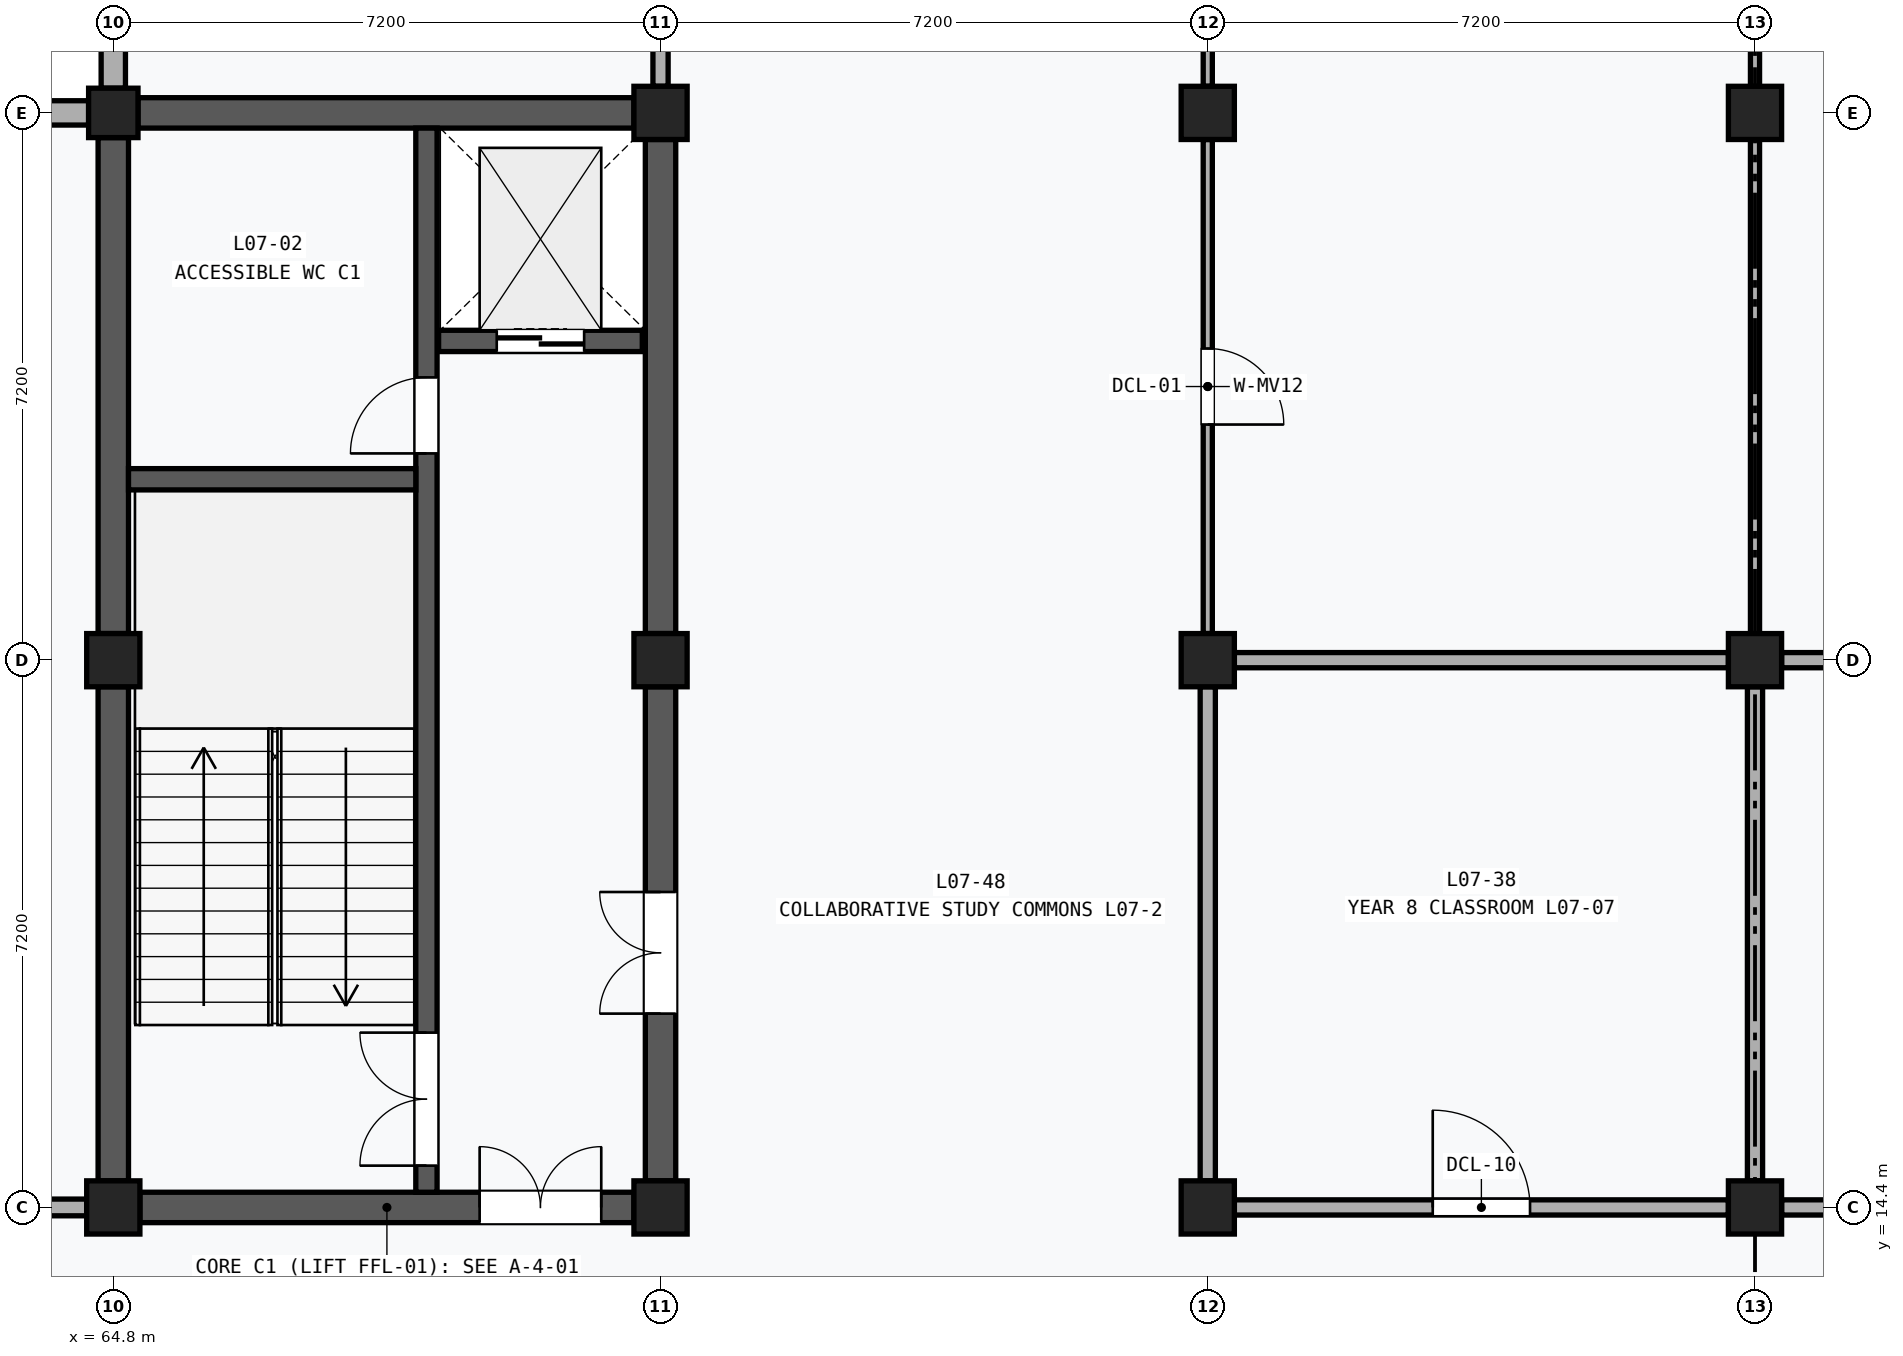
"""IFC4 building model, lengths in metres.
Left out: names, types, materials, properties, quantities, classifications, styles, units other than length and angle.
Written with IfcOpenShell. Run it as: python <this file> out.ifc"""

import sys

from ifc_helpers import new_model, si_unit, direction, frame, frame_2d, origin, origin_2d, place, context, subcontext, project, spatial, rectangle, extrude, element, fill, save


model = new_model("IFC4")
c1 = context("Model", 3, precision=1e-05, world=origin(), true_north=direction((0.0, 1.0)))
c2 = subcontext(c1, "Body", "Model", "MODEL_VIEW")
j1 = project(units=[si_unit("LENGTHUNIT", "METRE"), si_unit("PLANEANGLEUNIT", "RADIAN")], contexts=[c1])
p1 = place(None, origin())
s1 = spatial("IfcSite", under=j1, at=p1, CompositionType="ELEMENT")
p2 = place(p1, origin())
s2 = spatial("IfcBuilding", under=s1, at=p2, CompositionType="ELEMENT")
p3 = place(p2, frame((0.0, 0.0, 30.6)))
s3 = spatial("IfcBuildingStorey", under=s2, at=p3, CompositionType="ELEMENT", Elevation=30.6)
for number, where, z_axis, x_axis in (
    (1, (64.8, 14.4, 0.0), (0.0, 0.0, 1.0), (1.0, 0.0, 0.0)),
    (2, (64.8, 21.6, 0.0), (0.0, 0.0, 1.0), (1.0, 0.0, 0.0)),
):
    element("IfcColumn", number, at=place(p3, frame(where, z_axis=z_axis, x_axis=x_axis)), inside=s3, PredefinedType="COLUMN", context=c2, shape_type="SweptSolid", body=[
        extrude(rectangle(XDim=0.7, YDim=0.7, at=origin_2d()), origin(), (0.0, 0.0, 1.0), 4.2),
    ])
p4 = place(p3, frame((64.8, 28.8, 0.0), z_axis=(0.0, 0.0, 1.0), x_axis=(1.0, 0.0, 0.0)))
e3 = element("IfcColumn", 3, at=p4, inside=s3, PredefinedType="COLUMN", context=c2, shape_type="SweptSolid", body=[
    extrude(rectangle(XDim=0.65, YDim=0.65, at=origin_2d()), origin(), (0.0, 0.0, 1.0), 4.2),
])
for number, where, z_axis, x_axis in (
    (4, (72.0, 14.4, 0.0), (0.0, 0.0, 1.0), (1.0, 0.0, 0.0)),
    (5, (72.0, 21.6, 0.0), (0.0, 0.0, 1.0), (1.0, 0.0, 0.0)),
    (6, (72.0, 28.8, 0.0), (0.0, 0.0, 1.0), (1.0, 0.0, 0.0)),
    (7, (79.2, 14.4, 0.0), (0.0, 0.0, 1.0), (1.0, 0.0, 0.0)),
    (8, (79.2, 21.6, 0.0), (0.0, 0.0, 1.0), (1.0, 0.0, 0.0)),
    (9, (79.2, 28.8, 0.0), (0.0, 0.0, 1.0), (1.0, 0.0, 0.0)),
    (10, (86.4, 14.4, 0.0), (0.0, 0.0, 1.0), (1.0, 0.0, 0.0)),
    (11, (86.4, 21.6, 0.0), (0.0, 0.0, 1.0), (1.0, 0.0, 0.0)),
    (12, (86.4, 28.8, 0.0), (0.0, 0.0, 1.0), (1.0, 0.0, 0.0)),
):
    element("IfcColumn", number, at=place(p3, frame(where, z_axis=z_axis, x_axis=x_axis)), inside=s3, PredefinedType="COLUMN", context=c2, shape_type="SweptSolid", body=[
        extrude(rectangle(XDim=0.7, YDim=0.7, at=origin_2d()), origin(), (0.0, 0.0, 1.0), 4.2),
    ])
p5 = place(p3, frame((57.925, 28.8, 0.0), z_axis=(0.0, 0.0, 1.0), x_axis=(1.0, 0.0, 0.0)))
e13 = element("IfcWall", 13, at=p5, inside=s3, PredefinedType="SOLIDWALL", context=c2, shape_type="SweptSolid", body=[
    extrude(rectangle(XDim=6.55, YDim=0.32, at=frame_2d((3.275, 0.0))), origin(), (0.0, 0.0, 1.0), 3.25),
])
p6 = place(p5, frame((2.225, 0.0, 0.85)))
e14 = element("IfcOpeningElement", 14, at=p6, cuts=e13, PredefinedType="OPENING", context=c2, shape_type="SweptSolid", body=[
    extrude(rectangle(XDim=2.1, YDim=2.0, at=frame_2d((1.05, 1.0))), frame((0.0, 0.172, 0.0), z_axis=(0.0, -1.0, 0.0), x_axis=(1.0, 0.0, 0.0)), (0.0, 0.0, 1.0), 0.344),
])
p7 = place(p3, frame((64.8, 29.125, 0.0), z_axis=(0.0, 0.0, 1.0), x_axis=(0.0, 1.0, 0.0)))
e15 = element("IfcWall", 15, at=p7, inside=s3, PredefinedType="SOLIDWALL", context=c2, shape_type="SweptSolid", body=[
    extrude(rectangle(XDim=6.55, YDim=0.32, at=frame_2d((3.275, 0.0))), origin(), (0.0, 0.0, 1.0), 3.25),
])
p8 = place(p7, frame((2.075, 0.0, 0.85)))
e16 = element("IfcOpeningElement", 16, at=p8, cuts=e15, PredefinedType="OPENING", context=c2, shape_type="SweptSolid", body=[
    extrude(rectangle(XDim=2.4, YDim=2.0, at=frame_2d((1.2, 1.0))), frame((0.0, 0.172, 0.0), z_axis=(0.0, -1.0, 0.0), x_axis=(1.0, 0.0, 0.0)), (0.0, 0.0, 1.0), 0.344),
])
p9 = place(p3, frame((64.8, 14.75, 0.0), z_axis=(0.0, 0.0, 1.0), x_axis=(0.0, 1.0, 0.0)))
e17 = element("IfcWall", 17, at=p9, inside=s3, PredefinedType="SHEAR", context=c2, shape_type="SweptSolid", body=[
    extrude(rectangle(XDim=6.5, YDim=0.4, at=frame_2d((3.25, 0.0))), origin(), (0.0, 0.0, 1.0), 3.11),
])
p10 = place(p3, frame((64.8, 21.95, 0.0), z_axis=(0.0, 0.0, 1.0), x_axis=(0.0, 1.0, 0.0)))
e18 = element("IfcWall", 18, at=p10, inside=s3, PredefinedType="SHEAR", context=c2, shape_type="SweptSolid", body=[
    extrude(rectangle(XDim=6.525, YDim=0.4, at=frame_2d((3.263, 0.0))), origin(), (0.0, 0.0, 1.0), 3.11),
])
p11 = place(p3, frame((72.0, 14.75, 0.0), z_axis=(0.0, 0.0, 1.0), x_axis=(0.0, 1.0, 0.0)))
e19 = element("IfcWall", 19, at=p11, inside=s3, PredefinedType="SHEAR", context=c2, shape_type="SweptSolid", body=[
    extrude(rectangle(XDim=6.5, YDim=0.4, at=frame_2d((3.25, 0.0))), origin(), (0.0, 0.0, 1.0), 3.11),
])
p12 = place(p11, frame((2.2, 0.0, 0.0)))
e20 = element("IfcOpeningElement", 20, at=p12, cuts=e19, PredefinedType="OPENING", context=c2, shape_type="SweptSolid", body=[
    extrude(rectangle(XDim=1.6, YDim=2.2, at=frame_2d((0.8, 1.1))), frame((0.0, 0.212, 0.0), z_axis=(0.0, -1.0, 0.0), x_axis=(1.0, 0.0, 0.0)), (0.0, 0.0, 1.0), 0.424),
])
p13 = place(p3, frame((72.0, 21.95, 0.0), z_axis=(0.0, 0.0, 1.0), x_axis=(0.0, 1.0, 0.0)))
e21 = element("IfcWall", 21, at=p13, inside=s3, PredefinedType="SHEAR", context=c2, shape_type="SweptSolid", body=[
    extrude(rectangle(XDim=6.5, YDim=0.4, at=frame_2d((3.25, 0.0))), origin(), (0.0, 0.0, 1.0), 3.11),
])
p14 = place(p3, frame((65.15, 14.4, 0.0), z_axis=(0.0, 0.0, 1.0), x_axis=(1.0, 0.0, 0.0)))
e22 = element("IfcWall", 22, at=p14, inside=s3, PredefinedType="SHEAR", context=c2, shape_type="SweptSolid", body=[
    extrude(rectangle(XDim=6.5, YDim=0.4, at=frame_2d((3.25, 0.0))), origin(), (0.0, 0.0, 1.0), 3.11),
])
p15 = place(p14, frame((4.47, 0.0, 0.0)))
e23 = element("IfcOpeningElement", 23, at=p15, cuts=e22, PredefinedType="OPENING", context=c2, shape_type="SweptSolid", body=[
    extrude(rectangle(XDim=1.6, YDim=2.2, at=frame_2d((0.8, 1.1))), frame((0.0, 0.212, 0.0), z_axis=(0.0, -1.0, 0.0), x_axis=(1.0, 0.0, 0.0)), (0.0, 0.0, 1.0), 0.424),
])
p16 = place(p3, frame((65.125, 28.8, 0.0), z_axis=(0.0, 0.0, 1.0), x_axis=(1.0, 0.0, 0.0)))
e24 = element("IfcWall", 24, at=p16, inside=s3, PredefinedType="SHEAR", context=c2, shape_type="SweptSolid", body=[
    extrude(rectangle(XDim=6.525, YDim=0.4, at=frame_2d((3.262, 0.0))), origin(), (0.0, 0.0, 1.0), 3.11),
])
p17 = place(p3, frame((68.92, 14.6, 0.0), z_axis=(0.0, 0.0, 1.0), x_axis=(0.0, 1.0, 0.0)))
e25 = element("IfcWall", 25, at=p17, inside=s3, PredefinedType="SHEAR", context=c2, shape_type="SweptSolid", body=[
    extrude(rectangle(XDim=14.0, YDim=0.28, at=frame_2d((7.0, 0.0))), origin(), (0.0, 0.0, 1.0), 3.88),
])
p18 = place(p17, frame((0.35, 0.0, 0.0)))
e26 = element("IfcOpeningElement", 26, at=p18, cuts=e25, PredefinedType="OPENING", context=c2, shape_type="SweptSolid", body=[
    extrude(rectangle(XDim=1.75, YDim=2.15, at=frame_2d((0.875, 1.075))), frame((0.0, 0.152, 0.0), z_axis=(0.0, -1.0, 0.0), x_axis=(1.0, 0.0, 0.0)), (0.0, 0.0, 1.0), 0.304),
])
p19 = place(p17, frame((9.72, 0.0, 0.0)))
e27 = element("IfcOpeningElement", 27, at=p19, cuts=e25, PredefinedType="OPENING", context=c2, shape_type="SweptSolid", body=[
    extrude(rectangle(XDim=1.0, YDim=2.15, at=frame_2d((0.5, 1.075))), frame((0.0, 0.152, 0.0), z_axis=(0.0, -1.0, 0.0), x_axis=(1.0, 0.0, 0.0)), (0.0, 0.0, 1.0), 0.304),
])
p20 = place(p3, frame((65.0, 23.98, 0.0), z_axis=(0.0, 0.0, 1.0), x_axis=(1.0, 0.0, 0.0)))
e28 = element("IfcWall", 28, at=p20, inside=s3, PredefinedType="SHEAR", context=c2, shape_type="SweptSolid", body=[
    extrude(rectangle(XDim=3.78, YDim=0.28, at=frame_2d((1.89, 0.0))), origin(), (0.0, 0.0, 1.0), 3.88),
])
p21 = place(p3, frame((69.08, 25.8, 0.0), z_axis=(0.0, 0.0, 1.0), x_axis=(1.0, 0.0, 0.0)))
e29 = element("IfcWall", 29, at=p21, inside=s3, PredefinedType="SHEAR", context=c2, shape_type="SweptSolid", body=[
    extrude(rectangle(XDim=2.68, YDim=0.28, at=frame_2d((1.34, 0.0))), origin(), (0.0, 0.0, 1.0), 3.88),
])
p22 = place(p21, frame((0.765, 0.0, 0.0)))
e30 = element("IfcOpeningElement", 30, at=p22, cuts=e29, PredefinedType="OPENING", context=c2, shape_type="SweptSolid", body=[
    extrude(rectangle(XDim=1.15, YDim=2.2, at=frame_2d((0.575, 1.1))), frame((0.0, 0.152, 0.0), z_axis=(0.0, -1.0, 0.0), x_axis=(1.0, 0.0, 0.0)), (0.0, 0.0, 1.0), 0.304),
])
p23 = place(p3, frame((57.95, 14.4, 0.0), z_axis=(0.0, 0.0, 1.0), x_axis=(1.0, 0.0, 0.0)))
e31 = element("IfcWall", 31, at=p23, inside=s3, PredefinedType="PARTITIONING", context=c2, shape_type="SweptSolid", body=[
    extrude(rectangle(XDim=6.5, YDim=0.22, at=frame_2d((3.25, 0.0))), origin(), (0.0, 0.0, 1.0), 3.11),
])
p24 = place(p23, frame((2.73, 0.0, 0.0)))
e32 = element("IfcOpeningElement", 32, at=p24, cuts=e31, PredefinedType="OPENING", context=c2, shape_type="SweptSolid", body=[
    extrude(rectangle(XDim=1.04, YDim=2.14, at=frame_2d((0.52, 1.07))), frame((0.0, 0.122, 0.0), z_axis=(0.0, -1.0, 0.0), x_axis=(1.0, 0.0, 0.0)), (0.0, 0.0, 1.0), 0.244),
])
p25 = place(p3, frame((72.0, 29.15, 0.0), z_axis=(0.0, 0.0, 1.0), x_axis=(0.0, 1.0, 0.0)))
e33 = element("IfcWall", 33, at=p25, inside=s3, PredefinedType="PARTITIONING", context=c2, shape_type="SweptSolid", body=[
    extrude(rectangle(XDim=6.5, YDim=0.2, at=frame_2d((3.25, 0.0))), origin(), (0.0, 0.0, 1.0), 3.11),
])
p26 = place(p25, frame((2.67, 0.0, 0.0)))
e34 = element("IfcOpeningElement", 34, at=p26, cuts=e33, PredefinedType="OPENING", context=c2, shape_type="SweptSolid", body=[
    extrude(rectangle(XDim=1.16, YDim=2.22, at=frame_2d((0.58, 1.11))), frame((0.0, 0.112, 0.0), z_axis=(0.0, -1.0, 0.0), x_axis=(1.0, 0.0, 0.0)), (0.0, 0.0, 1.0), 0.224),
])
p27 = place(p3, frame((79.55, 14.4, 0.0), z_axis=(0.0, 0.0, 1.0), x_axis=(1.0, 0.0, 0.0)))
e35 = element("IfcWall", 35, at=p27, inside=s3, PredefinedType="PARTITIONING", context=c2, shape_type="SweptSolid", body=[
    extrude(rectangle(XDim=6.5, YDim=0.2, at=frame_2d((3.25, 0.0))), origin(), (0.0, 0.0, 1.0), 3.11),
])
p28 = place(p27, frame((2.61, 0.0, 0.0)))
e36 = element("IfcOpeningElement", 36, at=p28, cuts=e35, PredefinedType="OPENING", context=c2, shape_type="SweptSolid", body=[
    extrude(rectangle(XDim=1.28, YDim=2.28, at=frame_2d((0.64, 1.14))), frame((0.0, 0.112, 0.0), z_axis=(0.0, -1.0, 0.0), x_axis=(1.0, 0.0, 0.0)), (0.0, 0.0, 1.0), 0.224),
])
for number, where, z_axis, x_axis in (
    (37, (79.55, 21.6, 0.0), (0.0, 0.0, 1.0), (1.0, 0.0, 0.0)),
    (38, (79.2, 14.75, 0.0), (0.0, 0.0, 1.0), (0.0, 1.0, 0.0)),
    (39, (86.4, 14.75, 0.0), (0.0, 0.0, 1.0), (0.0, 1.0, 0.0)),
):
    element("IfcWall", number, at=place(p3, frame(where, z_axis=z_axis, x_axis=x_axis)), inside=s3, PredefinedType="PARTITIONING", context=c2, shape_type="SweptSolid", body=[
        extrude(rectangle(XDim=6.5, YDim=0.2, at=frame_2d((3.25, 0.0))), origin(), (0.0, 0.0, 1.0), 3.11),
    ])
p29 = place(p3, frame((79.2, 21.95, 0.0), z_axis=(0.0, 0.0, 1.0), x_axis=(0.0, 1.0, 0.0)))
e40 = element("IfcWall", 40, at=p29, inside=s3, PredefinedType="MOVABLE", context=c2, shape_type="SweptSolid", body=[
    extrude(rectangle(XDim=6.5, YDim=0.12, at=frame_2d((3.25, 0.0))), origin(), (0.0, 0.0, 1.0), 3.11),
])
p30 = place(p29, frame((2.75, 0.0, 0.0)))
e41 = element("IfcOpeningElement", 41, at=p30, cuts=e40, PredefinedType="OPENING", context=c2, shape_type="SweptSolid", body=[
    extrude(rectangle(XDim=1.0, YDim=2.1, at=frame_2d((0.5, 1.05))), frame((0.0, 0.072, 0.0), z_axis=(0.0, -1.0, 0.0), x_axis=(1.0, 0.0, 0.0)), (0.0, 0.0, 1.0), 0.144),
])
for number, where, z_axis, x_axis in (
    (42, (86.4, 21.95, 0.0), (0.0, 0.0, 1.0), (0.0, 1.0, 0.0)),
    (43, (79.2, 29.15, 0.0), (0.0, 0.0, 1.0), (0.0, 1.0, 0.0)),
    (44, (86.4, 29.15, 0.0), (0.0, 0.0, 1.0), (0.0, 1.0, 0.0)),
):
    element("IfcWall", number, at=place(p3, frame(where, z_axis=z_axis, x_axis=x_axis)), inside=s3, PredefinedType="MOVABLE", context=c2, shape_type="SweptSolid", body=[
        extrude(rectangle(XDim=6.5, YDim=0.12, at=frame_2d((3.25, 0.0))), origin(), (0.0, 0.0, 1.0), 3.11),
    ])
p31 = place(p3, frame((86.75, 14.4, 0.0), z_axis=(0.0, 0.0, 1.0), x_axis=(1.0, 0.0, 0.0)))
e45 = element("IfcWall", 45, at=p31, inside=s3, PredefinedType="PARTITIONING", context=c2, shape_type="SweptSolid", body=[
    extrude(rectangle(XDim=6.5, YDim=0.2, at=frame_2d((3.25, 0.0))), origin(), (0.0, 0.0, 1.0), 3.11),
])
p32 = place(p31, frame((2.73, 0.0, 0.0)))
e46 = element("IfcOpeningElement", 46, at=p32, cuts=e45, PredefinedType="OPENING", context=c2, shape_type="SweptSolid", body=[
    extrude(rectangle(XDim=1.04, YDim=2.14, at=frame_2d((0.52, 1.07))), frame((0.0, 0.112, 0.0), z_axis=(0.0, -1.0, 0.0), x_axis=(1.0, 0.0, 0.0)), (0.0, 0.0, 1.0), 0.224),
])
p33 = place(p3, frame((86.75, 21.6, 0.0), z_axis=(0.0, 0.0, 1.0), x_axis=(1.0, 0.0, 0.0)))
e47 = element("IfcWall", 47, at=p33, inside=s3, PredefinedType="PARTITIONING", context=c2, shape_type="SweptSolid", body=[
    extrude(rectangle(XDim=6.5, YDim=0.2, at=frame_2d((3.25, 0.0))), origin(), (0.0, 0.0, 1.0), 3.11),
])
p34 = place(p12, origin())
e48 = element("IfcDoor", 48, at=p34, inside=s3, OperationType="DOUBLE_DOOR_SINGLE_SWING", PredefinedType="DOOR", context=c2, shape_type="SweptSolid", body=[
    extrude(rectangle(XDim=1.6, YDim=2.2, at=frame_2d((0.8, 1.1))), frame((0.0, 0.025, 0.0), z_axis=(0.0, -1.0, 0.0), x_axis=(1.0, 0.0, 0.0)), (0.0, 0.0, 1.0), 0.05),
])
fill(e20, e48)
p35 = place(p15, origin())
e49 = element("IfcDoor", 49, at=p35, inside=s3, OperationType="DOUBLE_DOOR_SINGLE_SWING", PredefinedType="DOOR", context=c2, shape_type="SweptSolid", body=[
    extrude(rectangle(XDim=1.6, YDim=2.2, at=frame_2d((0.8, 1.1))), frame((0.0, 0.025, 0.0), z_axis=(0.0, -1.0, 0.0), x_axis=(1.0, 0.0, 0.0)), (0.0, 0.0, 1.0), 0.05),
])
fill(e23, e49)
p36 = place(p18, origin())
e50 = element("IfcDoor", 50, at=p36, inside=s3, OperationType="DOUBLE_DOOR_SINGLE_SWING", PredefinedType="DOOR", context=c2, shape_type="SweptSolid", body=[
    extrude(rectangle(XDim=1.75, YDim=2.15, at=frame_2d((0.875, 1.075))), frame((0.0, 0.025, 0.0), z_axis=(0.0, -1.0, 0.0), x_axis=(1.0, 0.0, 0.0)), (0.0, 0.0, 1.0), 0.05),
])
fill(e26, e50)
p37 = place(p19, origin())
e51 = element("IfcDoor", 51, at=p37, inside=s3, OperationType="SINGLE_SWING_LEFT", PredefinedType="DOOR", context=c2, shape_type="SweptSolid", body=[
    extrude(rectangle(XDim=1.0, YDim=2.15, at=frame_2d((0.5, 1.075))), frame((0.0, 0.025, 0.0), z_axis=(0.0, -1.0, 0.0), x_axis=(1.0, 0.0, 0.0)), (0.0, 0.0, 1.0), 0.05),
])
fill(e27, e51)
p38 = place(p22, frame((1.15, 0.0, 0.0), z_axis=(0.0, 0.0, 1.0), x_axis=(-1.0, 0.0, 0.0)))
e52 = element("IfcDoor", 52, at=p38, inside=s3, OperationType="DOUBLE_DOOR_SLIDING", PredefinedType="DOOR", context=c2, shape_type="SweptSolid", body=[
    extrude(rectangle(XDim=1.15, YDim=2.2, at=frame_2d((0.575, 1.1))), frame((0.0, 0.025, 0.0), z_axis=(0.0, -1.0, 0.0), x_axis=(1.0, 0.0, 0.0)), (0.0, 0.0, 1.0), 0.05),
])
fill(e30, e52)
p39 = place(p28, origin())
e53 = element("IfcDoor", 53, at=p39, inside=s3, OperationType="SINGLE_SWING_LEFT", PredefinedType="DOOR", context=c2, shape_type="SweptSolid", body=[
    extrude(rectangle(XDim=1.28, YDim=2.28, at=frame_2d((0.64, 1.14))), frame((0.0, 0.025, 0.0), z_axis=(0.0, -1.0, 0.0), x_axis=(1.0, 0.0, 0.0)), (0.0, 0.0, 1.0), 0.05),
])
fill(e36, e53)
p40 = place(p30, frame((1.0, 0.0, 0.0), z_axis=(0.0, 0.0, 1.0), x_axis=(-1.0, 0.0, 0.0)))
e54 = element("IfcDoor", 54, at=p40, inside=s3, OperationType="SINGLE_SWING_RIGHT", PredefinedType="DOOR", context=c2, shape_type="SweptSolid", body=[
    extrude(rectangle(XDim=1.0, YDim=2.1, at=frame_2d((0.5, 1.05))), frame((0.0, 0.025, 0.0), z_axis=(0.0, -1.0, 0.0), x_axis=(1.0, 0.0, 0.0)), (0.0, 0.0, 1.0), 0.05),
])
fill(e41, e54)
save(model, sys.argv[1])
